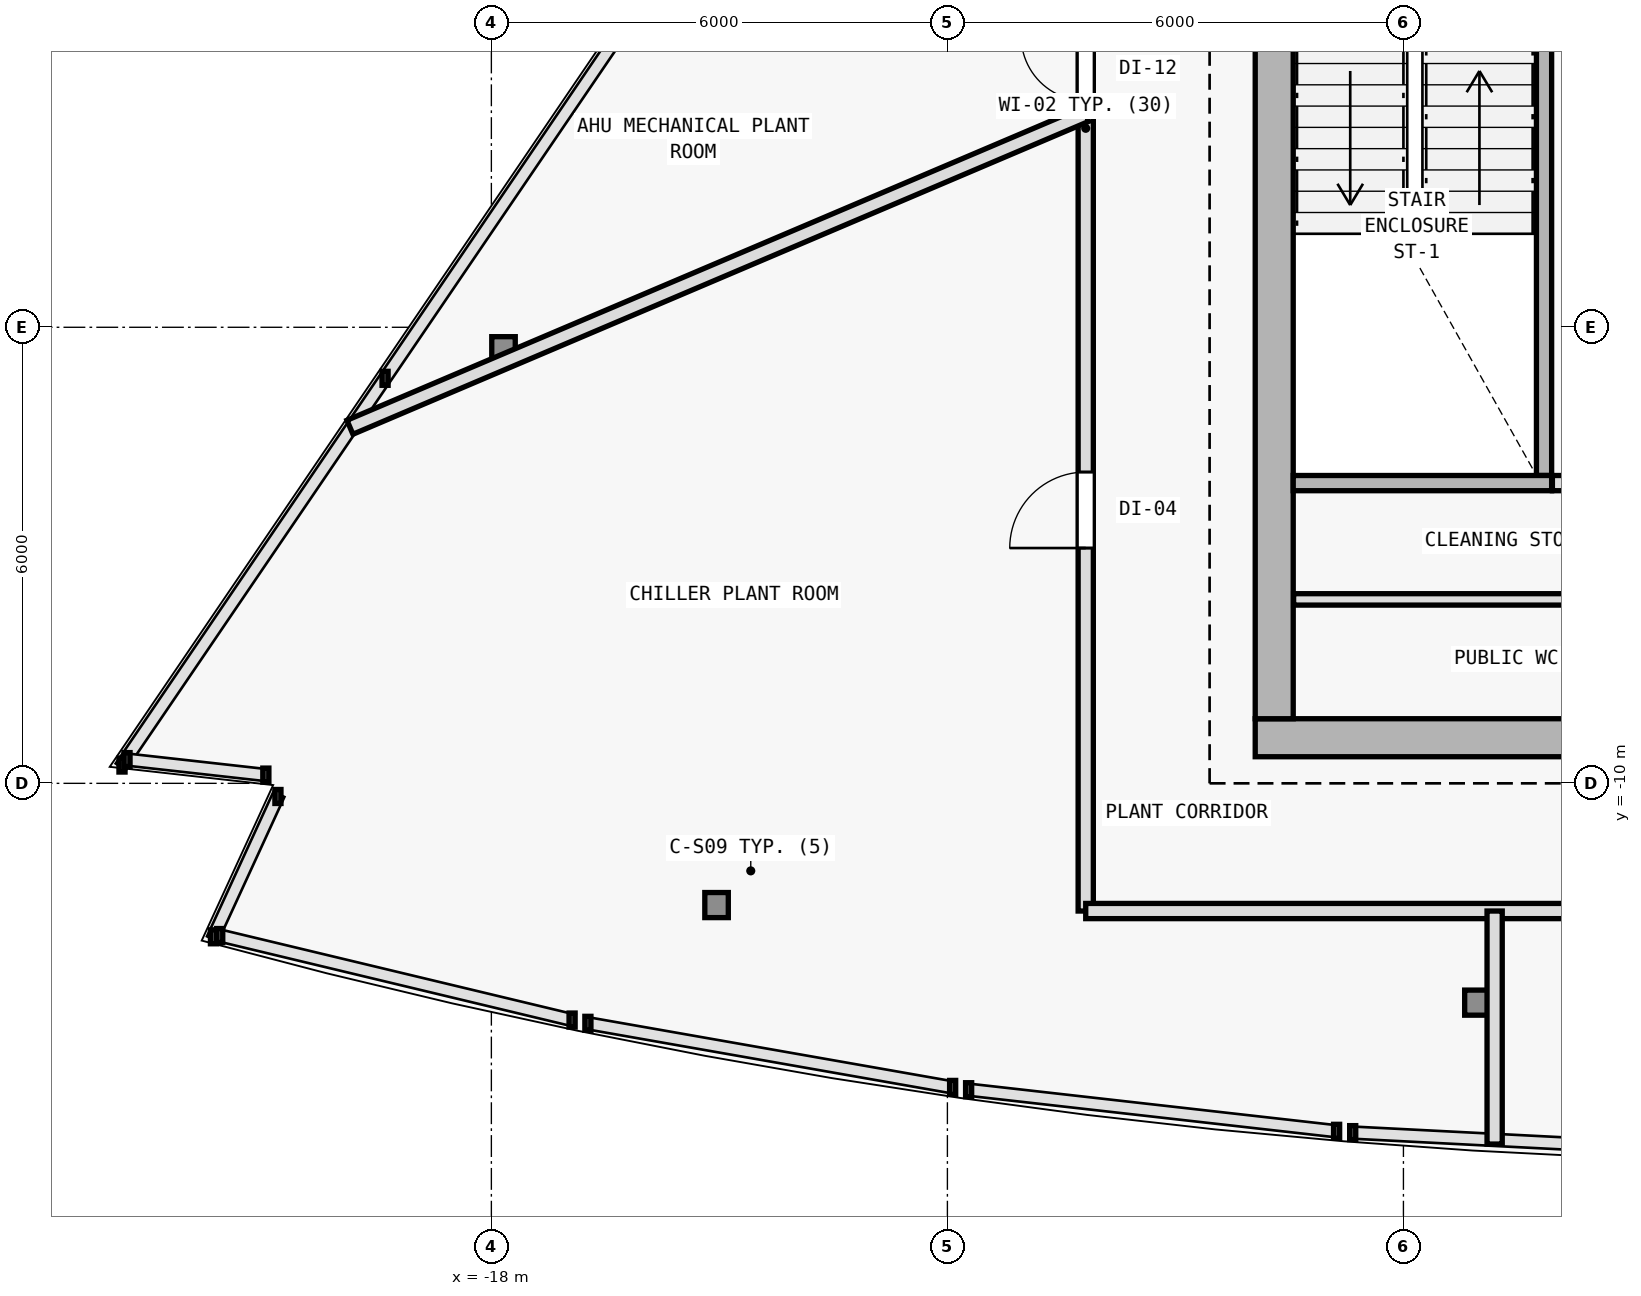
"""IFC4 building model, lengths in metres.
Left out: names, types, materials, properties, quantities, classifications, styles, units other than length and angle.
Written with IfcOpenShell. Run it as: python <this file> out.ifc"""

import sys

from ifc_helpers import new_model, si_unit, direction, frame, frame_2d, origin, origin_2d, place, context, subcontext, project, spatial, rectangle, i_section, extrude, element, fill, save


model = new_model("IFC4")
c1 = context("Model", 3, precision=1e-05, world=origin(), true_north=direction((0.0, 1.0)))
c2 = subcontext(c1, "Body", "Model", "MODEL_VIEW")
j1 = project(units=[si_unit("LENGTHUNIT", "METRE"), si_unit("PLANEANGLEUNIT", "RADIAN")], contexts=[c1])
p1 = place(None, origin())
s1 = spatial("IfcSite", under=j1, at=p1, CompositionType="ELEMENT")
p2 = place(p1, origin())
s2 = spatial("IfcBuilding", under=s1, at=p2, CompositionType="ELEMENT")
p3 = place(p2, frame((0.0, 0.0, 308.4)))
s3 = spatial("IfcBuildingStorey", under=s2, at=p3, CompositionType="ELEMENT", Elevation=308.4)
p4 = place(p3, frame((-7.7, -9.4, 0.0), z_axis=(0.0, 0.0, 1.0), x_axis=(1.0, 0.0, 0.0)))
e1 = element("IfcColumn", 1, at=p4, inside=s3, PredefinedType="COLUMN", context=c2, shape_type="SweptSolid", body=[
    extrude(i_section(OverallWidth=0.374, OverallDepth=0.372, WebThickness=0.012, FlangeThickness=0.02, FilletRadius=0.015, at=origin_2d()), origin(), (0.0, 0.0, 1.0), 3.6),
])
for number, where, z_axis, x_axis in (
    (2, (-15.037, -11.602, 0.0), (0.0, 0.0, 1.0), (1.0, 0.0, 0.0)),
    (3, (-5.04, -12.885, 0.0), (0.0, 0.0, 1.0), (1.0, 0.0, 0.0)),
    (4, (-17.84, -4.289, 0.0), (0.0, 0.0, 1.0), (1.0, 0.0, 0.0)),
):
    element("IfcColumn", number, at=place(p3, frame(where, z_axis=z_axis, x_axis=x_axis)), inside=s3, PredefinedType="COLUMN", context=c2, shape_type="SweptSolid", body=[
        extrude(i_section(OverallWidth=0.309, OverallDepth=0.33, WebThickness=0.011, FlangeThickness=0.019, FilletRadius=0.027, at=origin_2d()), origin(), (0.0, 0.0, 1.0), 3.6),
    ])
p5 = place(p3, frame((-7.95, -9.4, 0.0), z_axis=(0.0, 0.0, 1.0), x_axis=(1.0, 0.0, 0.0)))
e5 = element("IfcWall", 5, at=p5, inside=s3, PredefinedType="SHEAR", context=c2, shape_type="SweptSolid", body=[
    extrude(rectangle(XDim=15.9, YDim=0.5, at=frame_2d((7.95, 0.0))), origin(), (0.0, 0.0, 1.0), 3.34),
])
p6 = place(p5, frame((9.6, 0.0, 0.0)))
e6 = element("IfcOpeningElement", 6, at=p6, cuts=e5, PredefinedType="OPENING", context=c2, shape_type="SweptSolid", body=[
    extrude(rectangle(XDim=1.5, YDim=2.2, at=frame_2d((0.75, 1.1))), frame((0.0, 0.26, 0.0), z_axis=(0.0, -1.0, 0.0), x_axis=(1.0, 0.0, 0.0)), (0.0, 0.0, 1.0), 0.52),
])
p7 = place(p3, frame((-7.7, -9.15, 0.0), z_axis=(0.0, 0.0, 1.0), x_axis=(0.0, 1.0, 0.0)))
e7 = element("IfcWall", 7, at=p7, inside=s3, PredefinedType="SHEAR", context=c2, shape_type="SweptSolid", body=[
    extrude(rectangle(XDim=19.1, YDim=0.5, at=frame_2d((9.55, 0.0))), origin(), (0.0, 0.0, 1.0), 3.34),
])
p8 = place(p7, frame((12.7, 0.0, 0.0)))
e8 = element("IfcOpeningElement", 8, at=p8, cuts=e7, PredefinedType="OPENING", context=c2, shape_type="SweptSolid", body=[
    extrude(rectangle(XDim=1.1, YDim=2.15, at=frame_2d((0.55, 1.075))), frame((0.0, 0.26, 0.0), z_axis=(0.0, -1.0, 0.0), x_axis=(1.0, 0.0, 0.0)), (0.0, 0.0, 1.0), 0.52),
])
p9 = place(p3, frame((-4.15, -5.95, 0.0), z_axis=(0.0, 0.0, 1.0), x_axis=(0.0, 1.0, 0.0)))
e9 = element("IfcWall", 9, at=p9, inside=s3, PredefinedType="SOLIDWALL", context=c2, shape_type="SweptSolid", body=[
    extrude(rectangle(XDim=7.2, YDim=0.2, at=frame_2d((3.6, 0.0))), origin(), (0.0, 0.0, 1.0), 3.34),
])
p10 = place(p3, frame((-7.45, -6.05, 0.0), z_axis=(0.0, 0.0, 1.0), x_axis=(1.0, 0.0, 0.0)))
e10 = element("IfcWall", 10, at=p10, inside=s3, PredefinedType="SOLIDWALL", context=c2, shape_type="SweptSolid", body=[
    extrude(rectangle(XDim=3.4, YDim=0.2, at=frame_2d((1.7, 0.0))), origin(), (0.0, 0.0, 1.0), 3.34),
])
p11 = place(p3, frame((-4.04, -6.05, 0.0), z_axis=(0.0, 0.0, 1.0), x_axis=(1.0, 0.0, 0.0)))
e11 = element("IfcWall", 11, at=p11, inside=s3, PredefinedType="SOLIDWALL", context=c2, shape_type="SweptSolid", body=[
    extrude(rectangle(XDim=2.79, YDim=0.2, at=frame_2d((1.395, 0.0))), origin(), (0.0, 0.0, 1.0), 3.34),
])
p12 = place(p3, frame((-7.445, -7.58, 0.0), z_axis=(0.0, 0.0, 1.0), x_axis=(1.0, 0.0, 0.0)))
e12 = element("IfcWall", 12, at=p12, inside=s3, PredefinedType="PARTITIONING", context=c2, shape_type="SweptSolid", body=[
    extrude(rectangle(XDim=6.195, YDim=0.15, at=frame_2d((3.098, 0.0))), origin(), (0.0, 0.0, 1.0), 3.34),
])
p13 = place(p3, frame((-10.18, -11.68, 0.0), z_axis=(0.0, 0.0, 1.0), x_axis=(0.0, 1.0, 0.0)))
e13 = element("IfcWall", 13, at=p13, inside=s3, PredefinedType="SOLIDWALL", context=c2, shape_type="SweptSolid", body=[
    extrude(rectangle(XDim=20.595, YDim=0.2, at=frame_2d((10.298, 0.0))), origin(), (0.0, 0.0, 1.0), 2.995),
])
p14 = place(p13, frame((10.66, 0.0, 0.0)))
e14 = element("IfcOpeningElement", 14, at=p14, cuts=e13, PredefinedType="OPENING", context=c2, shape_type="SweptSolid", body=[
    extrude(rectangle(XDim=0.85, YDim=2.1, at=frame_2d((0.425, 1.05))), frame((0.0, 0.11, 0.0), z_axis=(0.0, -1.0, 0.0), x_axis=(1.0, 0.0, 0.0)), (0.0, 0.0, 1.0), 0.22),
])
p15 = place(p13, frame((4.776, 0.0, 0.0)))
e15 = element("IfcOpeningElement", 15, at=p15, cuts=e13, PredefinedType="OPENING", context=c2, shape_type="SweptSolid", body=[
    extrude(rectangle(XDim=1.0, YDim=2.15, at=frame_2d((0.5, 1.075))), frame((0.0, 0.11, 0.0), z_axis=(0.0, -1.0, 0.0), x_axis=(1.0, 0.0, 0.0)), (0.0, 0.0, 1.0), 0.22),
])
p16 = place(p13, frame((16.497, 0.0, 0.0)))
e16 = element("IfcOpeningElement", 16, at=p16, cuts=e13, PredefinedType="OPENING", context=c2, shape_type="SweptSolid", body=[
    extrude(rectangle(XDim=1.0, YDim=2.15, at=frame_2d((0.5, 1.075))), frame((0.0, 0.11, 0.0), z_axis=(0.0, -1.0, 0.0), x_axis=(1.0, 0.0, 0.0)), (0.0, 0.0, 1.0), 0.22),
])
p17 = place(p13, frame((12.198, 0.0, 0.0)))
e17 = element("IfcOpeningElement", 17, at=p17, cuts=e13, PredefinedType="OPENING", context=c2, shape_type="SweptSolid", body=[
    extrude(rectangle(XDim=0.85, YDim=2.1, at=frame_2d((0.425, 1.05))), frame((0.0, 0.11, 0.0), z_axis=(0.0, -1.0, 0.0), x_axis=(1.0, 0.0, 0.0)), (0.0, 0.0, 1.0), 0.22),
])
p18 = place(p3, frame((-10.18, -11.68, 0.0), z_axis=(0.0, 0.0, 1.0), x_axis=(1.0, 0.0, 0.0)))
e18 = element("IfcWall", 18, at=p18, inside=s3, PredefinedType="SOLIDWALL", context=c2, shape_type="SweptSolid", body=[
    extrude(rectangle(XDim=18.13, YDim=0.2, at=frame_2d((9.065, 0.0))), origin(), (0.0, 0.0, 1.0), 2.995),
])
p19 = place(p18, frame((8.58, 0.0, 0.0)))
e19 = element("IfcOpeningElement", 19, at=p19, cuts=e18, PredefinedType="OPENING", context=c2, shape_type="SweptSolid", body=[
    extrude(rectangle(XDim=1.0, YDim=2.15, at=frame_2d((0.5, 1.075))), frame((0.0, 0.11, 0.0), z_axis=(0.0, -1.0, 0.0), x_axis=(1.0, 0.0, 0.0)), (0.0, 0.0, 1.0), 0.22),
])
p20 = place(p18, frame((14.889, 0.0, 0.0)))
e20 = element("IfcOpeningElement", 20, at=p20, cuts=e18, PredefinedType="OPENING", context=c2, shape_type="SweptSolid", body=[
    extrude(rectangle(XDim=1.0, YDim=2.15, at=frame_2d((0.5, 1.075))), frame((0.0, 0.11, 0.0), z_axis=(0.0, -1.0, 0.0), x_axis=(1.0, 0.0, 0.0)), (0.0, 0.0, 1.0), 0.22),
])
p21 = place(p3, frame((-19.861, -5.315, 0.0), z_axis=(0.0, 0.0, 1.0), x_axis=(0.920301883317, 0.391208951282, 0.0)))
e21 = element("IfcWall", 21, at=p21, inside=s3, PredefinedType="SOLIDWALL", context=c2, shape_type="SweptSolid", body=[
    extrude(rectangle(XDim=10.519, YDim=0.2, at=frame_2d((5.26, 0.0))), origin(), (0.0, 0.0, 1.0), 2.995),
])
p22 = place(p3, frame((-4.8, -14.746, 0.0), z_axis=(0.0, 0.0, 1.0), x_axis=(0.0, 1.0, 0.0)))
e22 = element("IfcWall", 22, at=p22, inside=s3, PredefinedType="SOLIDWALL", context=c2, shape_type="SweptSolid", body=[
    extrude(rectangle(XDim=3.066, YDim=0.2, at=frame_2d((1.533, 0.0))), origin(), (0.0, 0.0, 1.0), 2.995),
])
p23 = place(p14, origin())
e23 = element("IfcDoor", 23, at=p23, inside=s3, OperationType="SINGLE_SWING_RIGHT", PredefinedType="DOOR", context=c2, shape_type="SweptSolid", body=[
    extrude(rectangle(XDim=0.85, YDim=2.1, at=frame_2d((0.425, 1.05))), frame((0.0, 0.025, 0.0), z_axis=(0.0, -1.0, 0.0), x_axis=(1.0, 0.0, 0.0)), (0.0, 0.0, 1.0), 0.05),
])
fill(e14, e23)
p24 = place(p15, origin())
e24 = element("IfcDoor", 24, at=p24, inside=s3, OperationType="SINGLE_SWING_LEFT", PredefinedType="DOOR", context=c2, shape_type="SweptSolid", body=[
    extrude(rectangle(XDim=1.0, YDim=2.15, at=frame_2d((0.5, 1.075))), frame((0.0, 0.025, 0.0), z_axis=(0.0, -1.0, 0.0), x_axis=(1.0, 0.0, 0.0)), (0.0, 0.0, 1.0), 0.05),
])
fill(e15, e24)
save(model, sys.argv[1])
